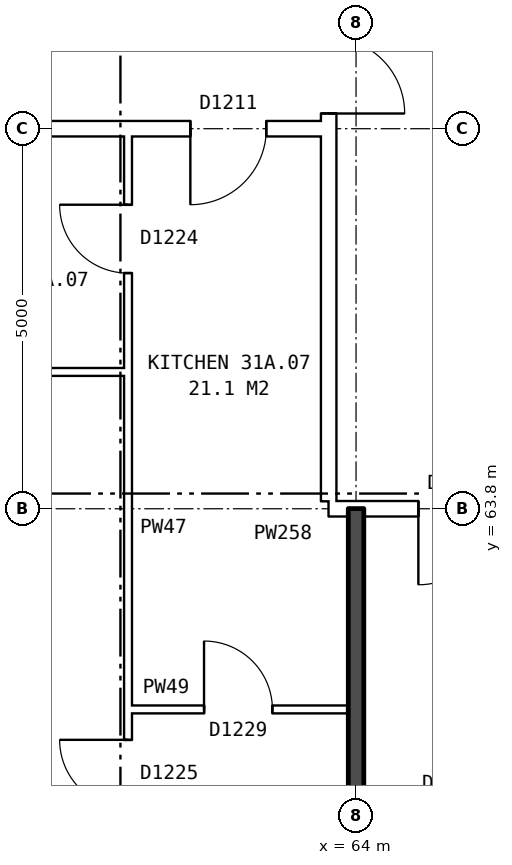
"""IFC4 building model, lengths in metres.
Left out: names, types, materials, properties, quantities, classifications, styles, units other than length and angle.
Written with IfcOpenShell. Run it as: python <this file> out.ifc"""

import sys

from ifc_helpers import new_model, si_unit, direction, frame, frame_2d, origin, place, context, subcontext, project, spatial, rectangle, extrude, element, fill, save


model = new_model("IFC4")
c1 = context("Model", 3, precision=1e-05, world=origin(), true_north=direction((0.0, 1.0)))
c2 = subcontext(c1, "Body", "Model", "MODEL_VIEW")
j1 = project(units=[si_unit("LENGTHUNIT", "METRE"), si_unit("PLANEANGLEUNIT", "RADIAN")], contexts=[c1])
p1 = place(None, origin())
s1 = spatial("IfcSite", under=j1, at=p1, CompositionType="ELEMENT")
p2 = place(p1, origin())
s2 = spatial("IfcBuilding", under=s1, at=p2, CompositionType="ELEMENT")
p3 = place(p2, frame((0.0, 0.0, 111.9)))
s3 = spatial("IfcBuildingStorey", under=s2, at=p3, CompositionType="ELEMENT", Elevation=111.9)
p4 = place(p3, frame((63.64, 63.9, 0.0), z_axis=(0.0, 0.0, 1.0), x_axis=(0.0, 1.0, 0.0)))
e1 = element("IfcWall", 1, at=p4, inside=s3, PredefinedType="PARTITIONING", context=c2, shape_type="SweptSolid", body=[
    extrude(rectangle(XDim=12.2, YDim=0.2, at=frame_2d((6.1, 0.0))), origin(), (0.0, 0.0, 1.0), 2.85),
])
p5 = place(p4, frame((5.1, 0.0, 0.0)))
e2 = element("IfcOpeningElement", 2, at=p5, cuts=e1, PredefinedType="OPENING", context=c2, shape_type="SweptSolid", body=[
    extrude(rectangle(XDim=2.0, YDim=2.1, at=frame_2d((1.0, 1.05))), frame((0.0, 0.11, 0.0), z_axis=(0.0, -1.0, 0.0), x_axis=(1.0, 0.0, 0.0)), (0.0, 0.0, 1.0), 0.22),
])
p6 = place(p3, frame((61.0, 61.16, 0.0), z_axis=(0.0, 0.0, 1.0), x_axis=(1.0, 0.0, 0.0)))
e3 = element("IfcWall", 3, at=p6, inside=s3, PredefinedType="PARTITIONING", context=c2, shape_type="SweptSolid", body=[
    extrude(rectangle(XDim=2.9, YDim=0.1, at=frame_2d((1.45, 0.0))), origin(), (0.0, 0.0, 1.0), 2.85),
])
p7 = place(p6, frame((1.0, 0.0, 0.0)))
e4 = element("IfcOpeningElement", 4, at=p7, cuts=e3, PredefinedType="OPENING", context=c2, shape_type="SweptSolid", body=[
    extrude(rectangle(XDim=0.9, YDim=2.1, at=frame_2d((0.45, 1.05))), frame((0.0, 0.06, 0.0), z_axis=(0.0, -1.0, 0.0), x_axis=(1.0, 0.0, 0.0)), (0.0, 0.0, 1.0), 0.12),
])
p8 = place(p3, frame((63.64, 63.8, 0.0), z_axis=(0.0, 0.0, 1.0), x_axis=(1.0, 0.0, 0.0)))
e5 = element("IfcWall", 5, at=p8, inside=s3, PredefinedType="PARTITIONING", context=c2, shape_type="SweptSolid", body=[
    extrude(rectangle(XDim=3.0, YDim=0.2, at=frame_2d((1.5, 0.0))), origin(), (0.0, 0.0, 1.0), 2.85),
])
p9 = place(p8, frame((1.18, 0.0, 0.0)))
e6 = element("IfcOpeningElement", 6, at=p9, cuts=e5, PredefinedType="OPENING", context=c2, shape_type="SweptSolid", body=[
    extrude(rectangle(XDim=1.0, YDim=2.1, at=frame_2d((0.5, 1.05))), frame((0.0, 0.11, 0.0), z_axis=(0.0, -1.0, 0.0), x_axis=(1.0, 0.0, 0.0)), (0.0, 0.0, 1.0), 0.22),
])
p10 = place(p3, frame((58.1, 65.6, 0.0), z_axis=(0.0, 0.0, 1.0), x_axis=(1.0, 0.0, 0.0)))
e7 = element("IfcWall", 7, at=p10, inside=s3, PredefinedType="PARTITIONING", context=c2, shape_type="SweptSolid", body=[
    extrude(rectangle(XDim=2.9, YDim=0.1, at=frame_2d((1.45, 0.0))), origin(), (0.0, 0.0, 1.0), 2.85),
])
p11 = place(p3, frame((44.36, 68.8, 0.0), z_axis=(0.0, 0.0, 1.0), x_axis=(1.0, 0.0, 0.0)))
e8 = element("IfcWall", 8, at=p11, inside=s3, PredefinedType="PARTITIONING", context=c2, shape_type="SweptSolid", body=[
    extrude(rectangle(XDim=19.28, YDim=0.2, at=frame_2d((9.64, 0.0))), origin(), (0.0, 0.0, 1.0), 2.85),
])
p12 = place(p11, frame((17.46, 0.0, 0.0)))
e9 = element("IfcOpeningElement", 9, at=p12, cuts=e8, PredefinedType="OPENING", context=c2, shape_type="SweptSolid", body=[
    extrude(rectangle(XDim=1.0, YDim=2.1, at=frame_2d((0.5, 1.05))), frame((0.0, 0.11, 0.0), z_axis=(0.0, -1.0, 0.0), x_axis=(1.0, 0.0, 0.0)), (0.0, 0.0, 1.0), 0.22),
])
p13 = place(p11, frame((11.64, 0.0, 0.0)))
e10 = element("IfcOpeningElement", 10, at=p13, cuts=e8, PredefinedType="OPENING", context=c2, shape_type="SweptSolid", body=[
    extrude(rectangle(XDim=1.0, YDim=2.1, at=frame_2d((0.5, 1.05))), frame((0.0, 0.11, 0.0), z_axis=(0.0, -1.0, 0.0), x_axis=(1.0, 0.0, 0.0)), (0.0, 0.0, 1.0), 0.22),
])
p14 = place(p11, frame((2.64, 0.0, 0.0)))
e11 = element("IfcOpeningElement", 11, at=p14, cuts=e8, PredefinedType="OPENING", context=c2, shape_type="SweptSolid", body=[
    extrude(rectangle(XDim=1.0, YDim=2.1, at=frame_2d((0.5, 1.05))), frame((0.0, 0.11, 0.0), z_axis=(0.0, -1.0, 0.0), x_axis=(1.0, 0.0, 0.0)), (0.0, 0.0, 1.0), 0.22),
])
p15 = place(p3, frame((61.0, 54.36, 0.0), z_axis=(0.0, 0.0, 1.0), x_axis=(0.0, 1.0, 0.0)))
e12 = element("IfcWall", 12, at=p15, inside=s3, PredefinedType="PARTITIONING", context=c2, shape_type="SweptSolid", body=[
    extrude(rectangle(XDim=14.34, YDim=0.1, at=frame_2d((7.17, 0.0))), origin(), (0.0, 0.0, 1.0), 2.85),
])
p16 = place(p15, frame((5.5, 0.0, 0.0)))
e13 = element("IfcOpeningElement", 13, at=p16, cuts=e12, PredefinedType="OPENING", context=c2, shape_type="SweptSolid", body=[
    extrude(rectangle(XDim=0.9, YDim=2.1, at=frame_2d((0.45, 1.05))), frame((0.0, 0.06, 0.0), z_axis=(0.0, -1.0, 0.0), x_axis=(1.0, 0.0, 0.0)), (0.0, 0.0, 1.0), 0.12),
])
p17 = place(p15, frame((12.54, 0.0, 0.0)))
e14 = element("IfcOpeningElement", 14, at=p17, cuts=e12, PredefinedType="OPENING", context=c2, shape_type="SweptSolid", body=[
    extrude(rectangle(XDim=0.9, YDim=2.1, at=frame_2d((0.45, 1.05))), frame((0.0, 0.06, 0.0), z_axis=(0.0, -1.0, 0.0), x_axis=(1.0, 0.0, 0.0)), (0.0, 0.0, 1.0), 0.12),
])
p18 = place(p3, frame((64.0, 54.36, 0.0), z_axis=(0.0, 0.0, 1.0), x_axis=(0.0, 1.0, 0.0)))
e15 = element("IfcWall", 15, at=p18, inside=s3, PredefinedType="SOLIDWALL", context=c2, shape_type="SweptSolid", body=[
    extrude(rectangle(XDim=9.44, YDim=0.2, at=frame_2d((4.72, 0.0))), origin(), (0.0, 0.0, 1.0), 2.85),
])
p19 = place(p5, frame((2.0, 0.0, 0.0), z_axis=(0.0, 0.0, 1.0), x_axis=(-1.0, 0.0, 0.0)))
e16 = element("IfcDoor", 16, at=p19, inside=s3, OperationType="DOUBLE_DOOR_SINGLE_SWING", PredefinedType="DOOR", context=c2, shape_type="SweptSolid", body=[
    extrude(rectangle(XDim=2.0, YDim=2.1, at=frame_2d((1.0, 1.05))), frame((0.0, 0.025, 0.0), z_axis=(0.0, -1.0, 0.0), x_axis=(1.0, 0.0, 0.0)), (0.0, 0.0, 1.0), 0.05),
])
fill(e2, e16)
p20 = place(p9, frame((1.0, 0.0, 0.0), z_axis=(0.0, 0.0, 1.0), x_axis=(-1.0, 0.0, 0.0)))
e17 = element("IfcDoor", 17, at=p20, inside=s3, OperationType="SINGLE_SWING_RIGHT", PredefinedType="DOOR", context=c2, shape_type="SweptSolid", body=[
    extrude(rectangle(XDim=1.0, YDim=2.1, at=frame_2d((0.5, 1.05))), frame((0.0, 0.025, 0.0), z_axis=(0.0, -1.0, 0.0), x_axis=(1.0, 0.0, 0.0)), (0.0, 0.0, 1.0), 0.05),
])
fill(e6, e17)
p21 = place(p16, origin())
e18 = element("IfcDoor", 18, at=p21, inside=s3, OperationType="SINGLE_SWING_RIGHT", PredefinedType="DOOR", context=c2, shape_type="SweptSolid", body=[
    extrude(rectangle(XDim=0.9, YDim=2.1, at=frame_2d((0.45, 1.05))), frame((0.0, 0.025, 0.0), z_axis=(0.0, -1.0, 0.0), x_axis=(1.0, 0.0, 0.0)), (0.0, 0.0, 1.0), 0.05),
])
fill(e13, e18)
p22 = place(p12, frame((1.0, 0.0, 0.0), z_axis=(0.0, 0.0, 1.0), x_axis=(-1.0, 0.0, 0.0)))
e19 = element("IfcDoor", 19, at=p22, inside=s3, OperationType="SINGLE_SWING_RIGHT", PredefinedType="DOOR", context=c2, shape_type="SweptSolid", body=[
    extrude(rectangle(XDim=1.0, YDim=2.1, at=frame_2d((0.5, 1.05))), frame((0.0, 0.025, 0.0), z_axis=(0.0, -1.0, 0.0), x_axis=(1.0, 0.0, 0.0)), (0.0, 0.0, 1.0), 0.05),
])
fill(e9, e19)
p23 = place(p7, origin())
e20 = element("IfcDoor", 20, at=p23, inside=s3, OperationType="SINGLE_SWING_LEFT", PredefinedType="DOOR", context=c2, shape_type="SweptSolid", body=[
    extrude(rectangle(XDim=0.9, YDim=2.1, at=frame_2d((0.45, 1.05))), frame((0.0, 0.025, 0.0), z_axis=(0.0, -1.0, 0.0), x_axis=(1.0, 0.0, 0.0)), (0.0, 0.0, 1.0), 0.05),
])
fill(e4, e20)
p24 = place(p17, origin())
e21 = element("IfcDoor", 21, at=p24, inside=s3, OperationType="SINGLE_SWING_RIGHT", PredefinedType="DOOR", context=c2, shape_type="SweptSolid", body=[
    extrude(rectangle(XDim=0.9, YDim=2.1, at=frame_2d((0.45, 1.05))), frame((0.0, 0.025, 0.0), z_axis=(0.0, -1.0, 0.0), x_axis=(1.0, 0.0, 0.0)), (0.0, 0.0, 1.0), 0.05),
])
fill(e14, e21)
save(model, sys.argv[1])
